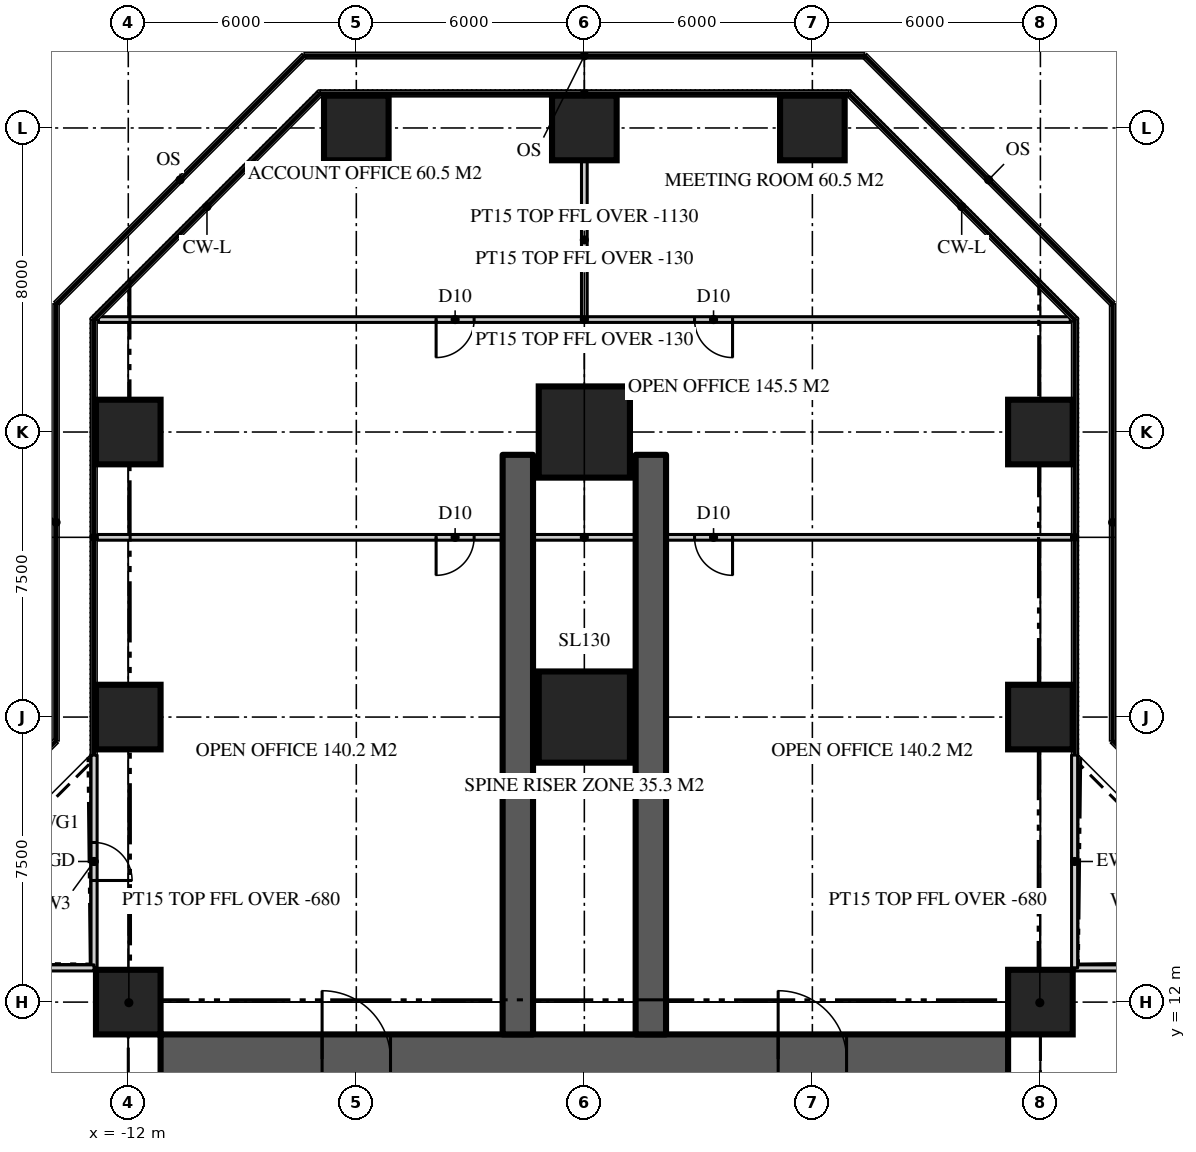
"""IFC4 building model, lengths in metres.
Left out: names, types, materials, properties, quantities, classifications, styles, units other than length and angle.
Written with IfcOpenShell. Run it as: python <this file> out.ifc"""

import sys

from ifc_helpers import new_model, si_unit, direction, frame, frame_2d, origin, origin_2d, place, context, subcontext, project, spatial, rectangle, extrude, element, fill, save


model = new_model("IFC4")
c1 = context("Model", 3, precision=1e-05, world=origin(), true_north=direction((0.0, 1.0)))
c2 = subcontext(c1, "Body", "Model", "MODEL_VIEW")
j1 = project(units=[si_unit("LENGTHUNIT", "METRE"), si_unit("PLANEANGLEUNIT", "RADIAN")], contexts=[c1])
p1 = place(None, origin())
s1 = spatial("IfcSite", under=j1, at=p1, CompositionType="ELEMENT")
p2 = place(p1, origin())
s2 = spatial("IfcBuilding", under=s1, at=p2, CompositionType="ELEMENT")
p3 = place(p2, frame((0.0, 0.0, 98.1)))
s3 = spatial("IfcBuildingStorey", under=s2, at=p3, CompositionType="ELEMENT", Elevation=98.1)
p4 = place(p3, frame((-11.15, 10.5, 0.0), z_axis=(0.0, 0.0, 1.0), x_axis=(1.0, 0.0, 0.0)))
e1 = element("IfcWall", 1, at=p4, inside=s3, PredefinedType="SHEAR", context=c2, shape_type="SweptSolid", body=[
    extrude(rectangle(XDim=22.3, YDim=1.3, at=frame_2d((11.15, 0.0))), origin(), (0.0, 0.0, 1.0), 3.9),
])
p5 = place(p4, frame((4.25, 0.0, 0.0)))
e2 = element("IfcOpeningElement", 2, at=p5, cuts=e1, PredefinedType="OPENING", context=c2, shape_type="SweptSolid", body=[
    extrude(rectangle(XDim=1.8, YDim=2.2, at=frame_2d((0.9, 1.1))), frame((0.0, 0.66, 0.0), z_axis=(0.0, -1.0, 0.0), x_axis=(1.0, 0.0, 0.0)), (0.0, 0.0, 1.0), 1.32),
])
p6 = place(p4, frame((16.25, 0.0, 0.0)))
e3 = element("IfcOpeningElement", 3, at=p6, cuts=e1, PredefinedType="OPENING", context=c2, shape_type="SweptSolid", body=[
    extrude(rectangle(XDim=1.8, YDim=2.2, at=frame_2d((0.9, 1.1))), frame((0.0, 0.66, 0.0), z_axis=(0.0, -1.0, 0.0), x_axis=(1.0, 0.0, 0.0)), (0.0, 0.0, 1.0), 1.32),
])
for number, where, z_axis, x_axis in (
    (4, (1.75, 11.15, 0.0), (0.0, 0.0, 1.0), (0.0, 1.0, 0.0)),
    (5, (-1.75, 11.15, 0.0), (0.0, 0.0, 1.0), (0.0, 1.0, 0.0)),
):
    element("IfcWall", number, at=place(p3, frame(where, z_axis=z_axis, x_axis=x_axis)), inside=s3, PredefinedType="SHEAR", context=c2, shape_type="SweptSolid", body=[
        extrude(rectangle(XDim=15.25, YDim=0.8, at=frame_2d((7.625, 0.0))), origin(), (0.0, 0.0, 1.0), 3.9),
    ])
for number, where, z_axis, x_axis in (
    (6, (-12.0, 12.0, 0.0), (0.0, 0.0, 1.0), (1.0, 0.0, 0.0)),
    (7, (12.0, 12.0, 0.0), (0.0, 0.0, 1.0), (1.0, 0.0, 0.0)),
    (8, (-12.0, 19.5, 0.0), (0.0, 0.0, 1.0), (1.0, 0.0, 0.0)),
):
    element("IfcColumn", number, at=place(p3, frame(where, z_axis=z_axis, x_axis=x_axis)), inside=s3, PredefinedType="COLUMN", context=c2, shape_type="SweptSolid", body=[
        extrude(rectangle(XDim=1.7, YDim=1.7, at=origin_2d()), origin(), (0.0, 0.0, 1.0), 3.9),
    ])
p7 = place(p3, frame((0.0, 19.5, 0.0), z_axis=(0.0, 0.0, 1.0), x_axis=(1.0, 0.0, 0.0)))
e9 = element("IfcColumn", 9, at=p7, inside=s3, PredefinedType="COLUMN", context=c2, shape_type="SweptSolid", body=[
    extrude(rectangle(XDim=2.4, YDim=2.4, at=origin_2d()), origin(), (0.0, 0.0, 1.0), 3.9),
])
for number, where, z_axis, x_axis in (
    (10, (12.0, 19.5, 0.0), (0.0, 0.0, 1.0), (1.0, 0.0, 0.0)),
    (11, (-12.0, 27.0, 0.0), (0.0, 0.0, 1.0), (1.0, 0.0, 0.0)),
):
    element("IfcColumn", number, at=place(p3, frame(where, z_axis=z_axis, x_axis=x_axis)), inside=s3, PredefinedType="COLUMN", context=c2, shape_type="SweptSolid", body=[
        extrude(rectangle(XDim=1.7, YDim=1.7, at=origin_2d()), origin(), (0.0, 0.0, 1.0), 3.9),
    ])
p8 = place(p3, frame((0.0, 27.0, 0.0), z_axis=(0.0, 0.0, 1.0), x_axis=(1.0, 0.0, 0.0)))
e12 = element("IfcColumn", 12, at=p8, inside=s3, PredefinedType="COLUMN", context=c2, shape_type="SweptSolid", body=[
    extrude(rectangle(XDim=2.4, YDim=2.4, at=origin_2d()), origin(), (0.0, 0.0, 1.0), 3.9),
])
for number, where, z_axis, x_axis in (
    (13, (12.0, 27.0, 0.0), (0.0, 0.0, 1.0), (1.0, 0.0, 0.0)),
    (14, (-6.0, 35.0, 0.0), (0.0, 0.0, 1.0), (1.0, 0.0, 0.0)),
    (15, (0.0, 35.0, 0.0), (0.0, 0.0, 1.0), (1.0, 0.0, 0.0)),
    (16, (6.0, 35.0, 0.0), (0.0, 0.0, 1.0), (1.0, 0.0, 0.0)),
):
    element("IfcColumn", number, at=place(p3, frame(where, z_axis=z_axis, x_axis=x_axis)), inside=s3, PredefinedType="COLUMN", context=c2, shape_type="SweptSolid", body=[
        extrude(rectangle(XDim=1.7, YDim=1.7, at=origin_2d()), origin(), (0.0, 0.0, 1.0), 3.9),
    ])
p9 = place(p3, frame((18.5, 12.9, 0.0), z_axis=(0.0, 0.0, 1.0), x_axis=(-1.0, 0.0, 0.0)))
e17 = element("IfcWall", 17, at=p9, inside=s3, PredefinedType="SOLIDWALL", context=c2, shape_type="SweptSolid", body=[
    extrude(rectangle(XDim=5.6, YDim=0.16, at=frame_2d((2.8, 0.0))), origin(), (0.0, 0.0, 1.0), 3.77),
])
p10 = place(p9, frame((2.3, 0.0, 0.0)))
e18 = element("IfcOpeningElement", 18, at=p10, cuts=e17, PredefinedType="OPENING", context=c2, shape_type="SweptSolid", body=[
    extrude(rectangle(XDim=1.0, YDim=2.2, at=frame_2d((0.5, 1.1))), frame((0.0, 0.09, 0.0), z_axis=(0.0, -1.0, 0.0), x_axis=(1.0, 0.0, 0.0)), (0.0, 0.0, 1.0), 0.18),
])
p11 = place(p3, frame((12.9, 12.9, 0.0), z_axis=(0.0, 0.0, 1.0), x_axis=(0.0, 1.0, 0.0)))
e19 = element("IfcWall", 19, at=p11, inside=s3, PredefinedType="SOLIDWALL", context=c2, shape_type="SweptSolid", body=[
    extrude(rectangle(XDim=5.6, YDim=0.16, at=frame_2d((2.8, 0.0))), origin(), (0.0, 0.0, 1.0), 3.77),
])
p12 = place(p3, frame((-12.9, 18.5, 0.0), z_axis=(0.0, 0.0, 1.0), x_axis=(0.0, -1.0, 0.0)))
e20 = element("IfcWall", 20, at=p12, inside=s3, PredefinedType="SOLIDWALL", context=c2, shape_type="SweptSolid", body=[
    extrude(rectangle(XDim=5.6, YDim=0.16, at=frame_2d((2.8, 0.0))), origin(), (0.0, 0.0, 1.0), 3.77),
])
p13 = place(p12, frame((2.3, 0.0, 0.0)))
e21 = element("IfcOpeningElement", 21, at=p13, cuts=e20, PredefinedType="OPENING", context=c2, shape_type="SweptSolid", body=[
    extrude(rectangle(XDim=1.0, YDim=2.2, at=frame_2d((0.5, 1.1))), frame((0.0, 0.09, 0.0), z_axis=(0.0, -1.0, 0.0), x_axis=(1.0, 0.0, 0.0)), (0.0, 0.0, 1.0), 0.18),
])
p14 = place(p3, frame((-12.9, 12.9, 0.0), z_axis=(0.0, 0.0, 1.0), x_axis=(-1.0, 0.0, 0.0)))
e22 = element("IfcWall", 22, at=p14, inside=s3, PredefinedType="SOLIDWALL", context=c2, shape_type="SweptSolid", body=[
    extrude(rectangle(XDim=5.6, YDim=0.16, at=frame_2d((2.8, 0.0))), origin(), (0.0, 0.0, 1.0), 3.77),
])
p15 = place(p3, frame((12.82, 24.229, 0.0), z_axis=(0.0, 0.0, 1.0), x_axis=(-1.0, 0.0, 0.0)))
e23 = element("IfcWall", 23, at=p15, inside=s3, PredefinedType="PARTITIONING", context=c2, shape_type="SweptSolid", body=[
    extrude(rectangle(XDim=25.64, YDim=0.15, at=frame_2d((12.82, 0.0))), origin(), (0.0, 0.0, 1.0), 3.77),
])
p16 = place(p15, frame((15.72, 0.0, 0.0)))
e24 = element("IfcOpeningElement", 24, at=p16, cuts=e23, PredefinedType="OPENING", context=c2, shape_type="SweptSolid", body=[
    extrude(rectangle(XDim=1.0, YDim=2.2, at=frame_2d((0.5, 1.1))), frame((0.0, 0.085, 0.0), z_axis=(0.0, -1.0, 0.0), x_axis=(1.0, 0.0, 0.0)), (0.0, 0.0, 1.0), 0.17),
])
p17 = place(p15, frame((8.92, 0.0, 0.0)))
e25 = element("IfcOpeningElement", 25, at=p17, cuts=e23, PredefinedType="OPENING", context=c2, shape_type="SweptSolid", body=[
    extrude(rectangle(XDim=1.0, YDim=2.2, at=frame_2d((0.5, 1.1))), frame((0.0, 0.085, 0.0), z_axis=(0.0, -1.0, 0.0), x_axis=(1.0, 0.0, 0.0)), (0.0, 0.0, 1.0), 0.17),
])
p18 = place(p3, frame((12.786, 29.959, 0.0), z_axis=(0.0, 0.0, 1.0), x_axis=(-1.0, 0.0, 0.0)))
e26 = element("IfcWall", 26, at=p18, inside=s3, PredefinedType="PARTITIONING", context=c2, shape_type="SweptSolid", body=[
    extrude(rectangle(XDim=25.573, YDim=0.15, at=frame_2d((12.786, 0.0))), origin(), (0.0, 0.0, 1.0), 3.77),
])
p19 = place(p18, frame((15.687, 0.0, 0.0)))
e27 = element("IfcOpeningElement", 27, at=p19, cuts=e26, PredefinedType="OPENING", context=c2, shape_type="SweptSolid", body=[
    extrude(rectangle(XDim=1.0, YDim=2.2, at=frame_2d((0.5, 1.1))), frame((0.0, 0.085, 0.0), z_axis=(0.0, -1.0, 0.0), x_axis=(1.0, 0.0, 0.0)), (0.0, 0.0, 1.0), 0.17),
])
p20 = place(p18, frame((8.886, 0.0, 0.0)))
e28 = element("IfcOpeningElement", 28, at=p20, cuts=e26, PredefinedType="OPENING", context=c2, shape_type="SweptSolid", body=[
    extrude(rectangle(XDim=1.0, YDim=2.2, at=frame_2d((0.5, 1.1))), frame((0.0, 0.085, 0.0), z_axis=(0.0, -1.0, 0.0), x_axis=(1.0, 0.0, 0.0)), (0.0, 0.0, 1.0), 0.17),
])
p21 = place(p3, frame((0.0, 29.959, 0.0), z_axis=(0.0, 0.0, 1.0), x_axis=(0.0, 1.0, 0.0)))
e29 = element("IfcWall", 29, at=p21, inside=s3, PredefinedType="PARTITIONING", context=c2, shape_type="SweptSolid", body=[
    extrude(rectangle(XDim=4.191, YDim=0.15, at=frame_2d((2.095, 0.0))), origin(), (0.0, 0.0, 1.0), 2.77),
])
for number, where, z_axis, x_axis in (
    (30, (11.15, 11.15, 0.0), (0.0, 0.0, 1.0), (0.707, 0.707, 0.0)),
    (31, (-11.15, 11.15, 0.0), (0.0, 0.0, 1.0), (-0.707, 0.707, 0.0)),
):
    element("IfcWall", number, at=place(p3, frame(where, z_axis=z_axis, x_axis=x_axis)), inside=s3, PredefinedType="PARTITIONING", context=c2, shape_type="SweptSolid", body=[
        extrude(rectangle(XDim=2.362, YDim=0.15, at=frame_2d((1.181, 0.0))), origin(), (0.0, 0.0, 1.0), 3.22),
    ])
p22 = place(p13, origin())
e32 = element("IfcDoor", 32, at=p22, inside=s3, OperationType="SINGLE_SWING_RIGHT", PredefinedType="DOOR", context=c2, shape_type="SweptSolid", body=[
    extrude(rectangle(XDim=1.0, YDim=2.2, at=frame_2d((0.5, 1.1))), frame((0.0, 0.025, 0.0), z_axis=(0.0, -1.0, 0.0), x_axis=(1.0, 0.0, 0.0)), (0.0, 0.0, 1.0), 0.05),
])
fill(e21, e32)
p23 = place(p5, origin())
e33 = element("IfcDoor", 33, at=p23, inside=s3, OperationType="DOUBLE_DOOR_DOUBLE_SWING", PredefinedType="DOOR", context=c2, shape_type="SweptSolid", body=[
    extrude(rectangle(XDim=1.8, YDim=2.2, at=frame_2d((0.9, 1.1))), frame((0.0, 0.025, 0.0), z_axis=(0.0, -1.0, 0.0), x_axis=(1.0, 0.0, 0.0)), (0.0, 0.0, 1.0), 0.05),
])
fill(e2, e33)
p24 = place(p6, origin())
e34 = element("IfcDoor", 34, at=p24, inside=s3, OperationType="DOUBLE_DOOR_DOUBLE_SWING", PredefinedType="DOOR", context=c2, shape_type="SweptSolid", body=[
    extrude(rectangle(XDim=1.8, YDim=2.2, at=frame_2d((0.9, 1.1))), frame((0.0, 0.025, 0.0), z_axis=(0.0, -1.0, 0.0), x_axis=(1.0, 0.0, 0.0)), (0.0, 0.0, 1.0), 0.05),
])
fill(e3, e34)
p25 = place(p16, origin())
e35 = element("IfcDoor", 35, at=p25, inside=s3, OperationType="SINGLE_SWING_RIGHT", PredefinedType="DOOR", context=c2, shape_type="SweptSolid", body=[
    extrude(rectangle(XDim=1.0, YDim=2.2, at=frame_2d((0.5, 1.1))), frame((0.0, 0.025, 0.0), z_axis=(0.0, -1.0, 0.0), x_axis=(1.0, 0.0, 0.0)), (0.0, 0.0, 1.0), 0.05),
])
fill(e24, e35)
p26 = place(p17, origin())
e36 = element("IfcDoor", 36, at=p26, inside=s3, OperationType="SINGLE_SWING_LEFT", PredefinedType="DOOR", context=c2, shape_type="SweptSolid", body=[
    extrude(rectangle(XDim=1.0, YDim=2.2, at=frame_2d((0.5, 1.1))), frame((0.0, 0.025, 0.0), z_axis=(0.0, -1.0, 0.0), x_axis=(1.0, 0.0, 0.0)), (0.0, 0.0, 1.0), 0.05),
])
fill(e25, e36)
p27 = place(p19, origin())
e37 = element("IfcDoor", 37, at=p27, inside=s3, OperationType="SINGLE_SWING_RIGHT", PredefinedType="DOOR", context=c2, shape_type="SweptSolid", body=[
    extrude(rectangle(XDim=1.0, YDim=2.2, at=frame_2d((0.5, 1.1))), frame((0.0, 0.025, 0.0), z_axis=(0.0, -1.0, 0.0), x_axis=(1.0, 0.0, 0.0)), (0.0, 0.0, 1.0), 0.05),
])
fill(e27, e37)
p28 = place(p20, origin())
e38 = element("IfcDoor", 38, at=p28, inside=s3, OperationType="SINGLE_SWING_LEFT", PredefinedType="DOOR", context=c2, shape_type="SweptSolid", body=[
    extrude(rectangle(XDim=1.0, YDim=2.2, at=frame_2d((0.5, 1.1))), frame((0.0, 0.025, 0.0), z_axis=(0.0, -1.0, 0.0), x_axis=(1.0, 0.0, 0.0)), (0.0, 0.0, 1.0), 0.05),
])
fill(e28, e38)
save(model, sys.argv[1])
